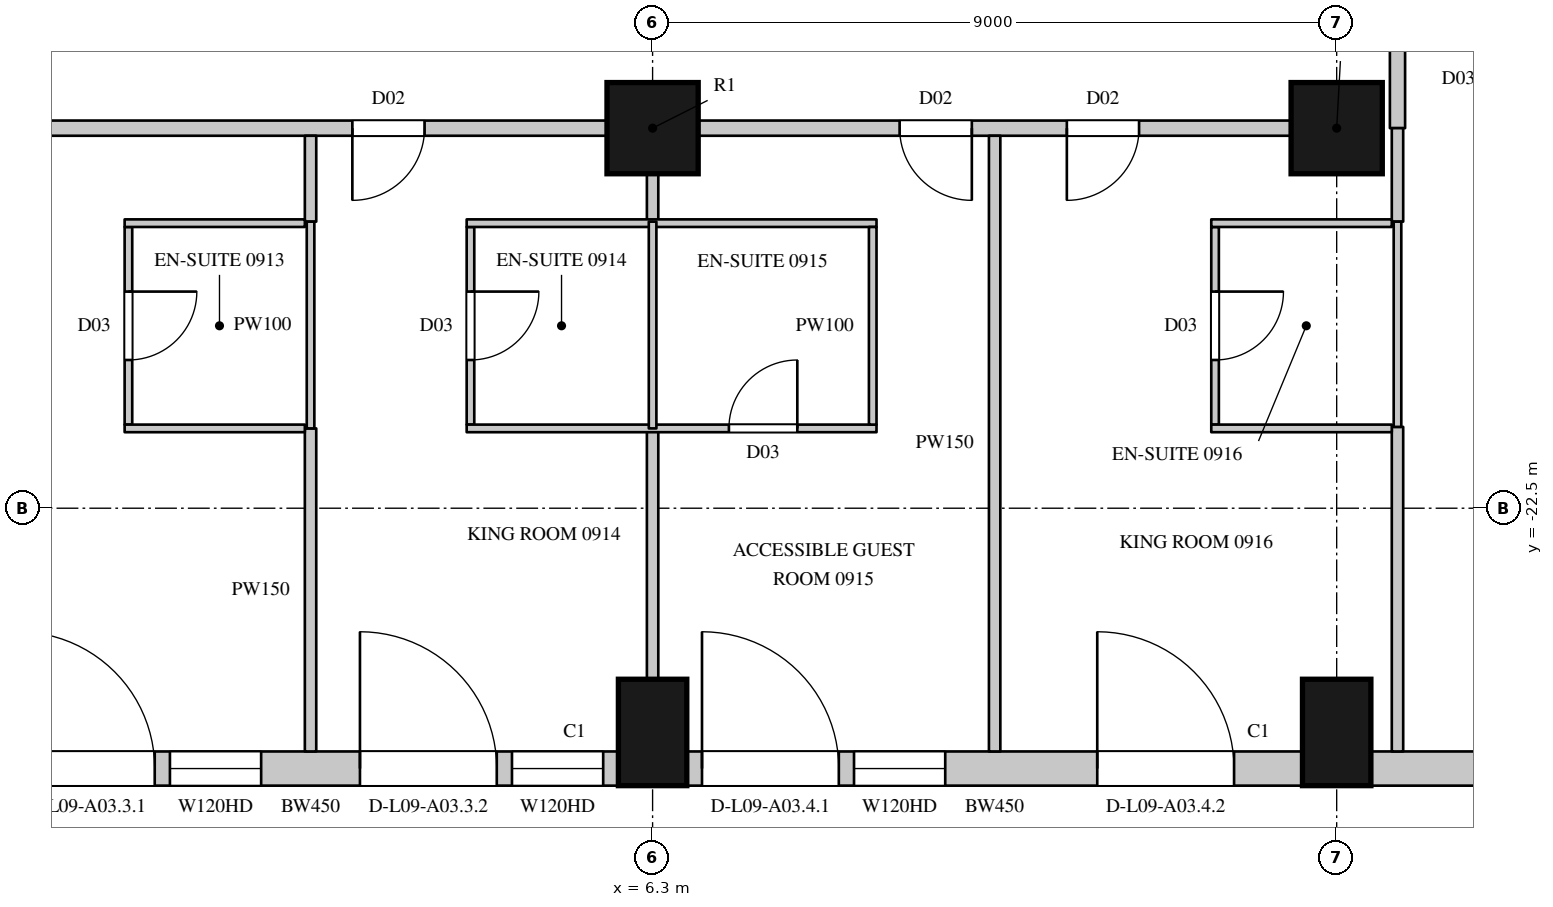
"""IFC4 building model, lengths in metres.
Left out: names, types, materials, properties, quantities, classifications, styles, units other than length and angle.
Written with IfcOpenShell. Run it as: python <this file> out.ifc"""

import sys

from ifc_helpers import new_model, si_unit, direction, frame, frame_2d, origin, origin_2d, place, context, subcontext, project, spatial, rectangle, circle, extrude, element, fill, save


model = new_model("IFC4")
c1 = context("Model", 3, precision=1e-05, world=origin(), true_north=direction((0.0, 1.0)))
c2 = subcontext(c1, "Body", "Model", "MODEL_VIEW")
j1 = project(units=[si_unit("LENGTHUNIT", "METRE"), si_unit("PLANEANGLEUNIT", "RADIAN")], contexts=[c1])
p1 = place(None, origin())
s1 = spatial("IfcSite", under=j1, at=p1, CompositionType="ELEMENT")
p2 = place(p1, origin())
s2 = spatial("IfcBuilding", under=s1, at=p2, CompositionType="ELEMENT")
p3 = place(p2, frame((0.0, 0.0, 62.7)))
s3 = spatial("IfcBuildingStorey", under=s2, at=p3, CompositionType="ELEMENT", Elevation=62.7)
for number, where, z_axis, x_axis in (
    (1, (6.3, -25.45, 0.0), (0.0, 0.0, 1.0), (1.0, 0.0, 0.0)),
    (2, (15.3, -25.45, 0.0), (0.0, 0.0, 1.0), (1.0, 0.0, 0.0)),
):
    element("IfcColumn", number, at=place(p3, frame(where, z_axis=z_axis, x_axis=x_axis)), inside=s3, PredefinedType="COLUMN", context=c2, shape_type="SweptSolid", body=[
        extrude(rectangle(XDim=0.9, YDim=1.4, at=origin_2d()), origin(), (0.0, 0.0, 1.0), 3.6),
    ])
for number, where, z_axis, x_axis in (
    (3, (6.3, -17.5, 0.0), (0.0, 0.0, 1.0), (1.0, 0.0, 0.0)),
    (4, (15.3, -17.5, 0.0), (0.0, 0.0, 1.0), (1.0, 0.0, 0.0)),
):
    element("IfcColumn", number, at=place(p3, frame(where, z_axis=z_axis, x_axis=x_axis)), inside=s3, PredefinedType="COLUMN", context=c2, shape_type="SweptSolid", body=[
        extrude(circle(Radius=0.6, at=origin_2d()), origin(), (0.0, 0.0, 1.0), 3.6),
    ])
p4 = place(p3, frame((-2.25, -25.925, 0.0), z_axis=(0.0, 0.0, 1.0), x_axis=(1.0, 0.0, 0.0)))
e5 = element("IfcWall", 5, at=p4, inside=s3, PredefinedType="SOLIDWALL", context=c2, shape_type="SweptSolid", body=[
    extrude(rectangle(XDim=8.1, YDim=0.45, at=frame_2d((4.05, 0.0))), origin(), (0.0, 0.0, 1.0), 3.3),
])
p5 = place(p4, frame((0.2, 0.0, 0.0)))
e6 = element("IfcOpeningElement", 6, at=p5, cuts=e5, PredefinedType="OPENING", context=c2, shape_type="SweptSolid", body=[
    extrude(rectangle(XDim=1.8, YDim=2.4, at=frame_2d((0.9, 1.2))), frame((0.0, 0.235, 0.0), z_axis=(0.0, -1.0, 0.0), x_axis=(1.0, 0.0, 0.0)), (0.0, 0.0, 1.0), 0.47),
])
p6 = place(p4, frame((2.2, 0.0, 1.05)))
e7 = element("IfcOpeningElement", 7, at=p6, cuts=e5, PredefinedType="OPENING", context=c2, shape_type="SweptSolid", body=[
    extrude(rectangle(XDim=1.2, YDim=2.0, at=frame_2d((0.6, 1.0))), frame((0.0, 0.235, 0.0), z_axis=(0.0, -1.0, 0.0), x_axis=(1.0, 0.0, 0.0)), (0.0, 0.0, 1.0), 0.47),
])
p7 = place(p4, frame((4.7, 0.0, 0.0)))
e8 = element("IfcOpeningElement", 8, at=p7, cuts=e5, PredefinedType="OPENING", context=c2, shape_type="SweptSolid", body=[
    extrude(rectangle(XDim=1.8, YDim=2.4, at=frame_2d((0.9, 1.2))), frame((0.0, 0.235, 0.0), z_axis=(0.0, -1.0, 0.0), x_axis=(1.0, 0.0, 0.0)), (0.0, 0.0, 1.0), 0.47),
])
p8 = place(p4, frame((6.7, 0.0, 1.05)))
e9 = element("IfcOpeningElement", 9, at=p8, cuts=e5, PredefinedType="OPENING", context=c2, shape_type="SweptSolid", body=[
    extrude(rectangle(XDim=1.2, YDim=2.0, at=frame_2d((0.6, 1.0))), frame((0.0, 0.235, 0.0), z_axis=(0.0, -1.0, 0.0), x_axis=(1.0, 0.0, 0.0)), (0.0, 0.0, 1.0), 0.47),
])
p9 = place(p3, frame((6.75, -25.925, 0.0), z_axis=(0.0, 0.0, 1.0), x_axis=(1.0, 0.0, 0.0)))
e10 = element("IfcWall", 10, at=p9, inside=s3, PredefinedType="SOLIDWALL", context=c2, shape_type="SweptSolid", body=[
    extrude(rectangle(XDim=8.1, YDim=0.45, at=frame_2d((4.05, 0.0))), origin(), (0.0, 0.0, 1.0), 3.3),
])
p10 = place(p9, frame((0.2, 0.0, 0.0)))
e11 = element("IfcOpeningElement", 11, at=p10, cuts=e10, PredefinedType="OPENING", context=c2, shape_type="SweptSolid", body=[
    extrude(rectangle(XDim=1.8, YDim=2.4, at=frame_2d((0.9, 1.2))), frame((0.0, 0.235, 0.0), z_axis=(0.0, -1.0, 0.0), x_axis=(1.0, 0.0, 0.0)), (0.0, 0.0, 1.0), 0.47),
])
p11 = place(p9, frame((2.2, 0.0, 1.05)))
e12 = element("IfcOpeningElement", 12, at=p11, cuts=e10, PredefinedType="OPENING", context=c2, shape_type="SweptSolid", body=[
    extrude(rectangle(XDim=1.2, YDim=2.0, at=frame_2d((0.6, 1.0))), frame((0.0, 0.235, 0.0), z_axis=(0.0, -1.0, 0.0), x_axis=(1.0, 0.0, 0.0)), (0.0, 0.0, 1.0), 0.47),
])
p12 = place(p9, frame((5.4, 0.0, 0.0)))
e13 = element("IfcOpeningElement", 13, at=p12, cuts=e10, PredefinedType="OPENING", context=c2, shape_type="SweptSolid", body=[
    extrude(rectangle(XDim=1.8, YDim=2.4, at=frame_2d((0.9, 1.2))), frame((0.0, 0.235, 0.0), z_axis=(0.0, -1.0, 0.0), x_axis=(1.0, 0.0, 0.0)), (0.0, 0.0, 1.0), 0.47),
])
p13 = place(p3, frame((15.75, -25.925, 0.0), z_axis=(0.0, 0.0, 1.0), x_axis=(1.0, 0.0, 0.0)))
e14 = element("IfcWall", 14, at=p13, inside=s3, PredefinedType="SOLIDWALL", context=c2, shape_type="SweptSolid", body=[
    extrude(rectangle(XDim=2.914, YDim=0.45, at=frame_2d((1.457, 0.0))), origin(), (0.0, 0.0, 1.0), 3.3),
])
p14 = place(p3, frame((-2.1, -17.5, 0.0), z_axis=(0.0, 0.0, 1.0), x_axis=(1.0, 0.0, 0.0)))
e15 = element("IfcWall", 15, at=p14, inside=s3, PredefinedType="PARTITIONING", context=c2, shape_type="SweptSolid", body=[
    extrude(rectangle(XDim=7.8, YDim=0.2, at=frame_2d((3.9, 0.0))), origin(), (0.0, 0.0, 1.0), 2.75),
])
p15 = place(p14, frame((4.45, 0.0, 0.0)))
e16 = element("IfcOpeningElement", 16, at=p15, cuts=e15, PredefinedType="OPENING", context=c2, shape_type="SweptSolid", body=[
    extrude(rectangle(XDim=0.95, YDim=2.2, at=frame_2d((0.475, 1.1))), frame((0.0, 0.11, 0.0), z_axis=(0.0, -1.0, 0.0), x_axis=(1.0, 0.0, 0.0)), (0.0, 0.0, 1.0), 0.22),
])
p16 = place(p3, frame((6.9, -17.5, 0.0), z_axis=(0.0, 0.0, 1.0), x_axis=(1.0, 0.0, 0.0)))
e17 = element("IfcWall", 17, at=p16, inside=s3, PredefinedType="PARTITIONING", context=c2, shape_type="SweptSolid", body=[
    extrude(rectangle(XDim=7.8, YDim=0.2, at=frame_2d((3.9, 0.0))), origin(), (0.0, 0.0, 1.0), 2.75),
])
p17 = place(p16, frame((2.65, 0.0, 0.0)))
e18 = element("IfcOpeningElement", 18, at=p17, cuts=e17, PredefinedType="OPENING", context=c2, shape_type="SweptSolid", body=[
    extrude(rectangle(XDim=0.95, YDim=2.2, at=frame_2d((0.475, 1.1))), frame((0.0, 0.11, 0.0), z_axis=(0.0, -1.0, 0.0), x_axis=(1.0, 0.0, 0.0)), (0.0, 0.0, 1.0), 0.22),
])
p18 = place(p16, frame((4.85, 0.0, 0.0)))
e19 = element("IfcOpeningElement", 19, at=p18, cuts=e17, PredefinedType="OPENING", context=c2, shape_type="SweptSolid", body=[
    extrude(rectangle(XDim=0.95, YDim=2.2, at=frame_2d((0.475, 1.1))), frame((0.0, 0.11, 0.0), z_axis=(0.0, -1.0, 0.0), x_axis=(1.0, 0.0, 0.0)), (0.0, 0.0, 1.0), 0.22),
])
p19 = place(p3, frame((16.1, -17.5, 0.0), z_axis=(0.0, 0.0, 1.0), x_axis=(0.0, 1.0, 0.0)))
e20 = element("IfcWall", 20, at=p19, inside=s3, PredefinedType="PARTITIONING", context=c2, shape_type="SweptSolid", body=[
    extrude(rectangle(XDim=12.75, YDim=0.2, at=frame_2d((6.375, 0.0))), origin(), (0.0, 0.0, 1.0), 3.3),
])
p20 = place(p19, frame((2.75, 0.0, 0.0)))
e21 = element("IfcOpeningElement", 21, at=p20, cuts=e20, PredefinedType="OPENING", context=c2, shape_type="SweptSolid", body=[
    extrude(rectangle(XDim=0.95, YDim=2.2, at=frame_2d((0.475, 1.1))), frame((0.0, 0.11, 0.0), z_axis=(0.0, -1.0, 0.0), x_axis=(1.0, 0.0, 0.0)), (0.0, 0.0, 1.0), 0.22),
])
p21 = place(p19, frame((6.95, 0.0, 0.0)))
e22 = element("IfcOpeningElement", 22, at=p21, cuts=e20, PredefinedType="OPENING", context=c2, shape_type="SweptSolid", body=[
    extrude(rectangle(XDim=0.95, YDim=2.2, at=frame_2d((0.475, 1.1))), frame((0.0, 0.11, 0.0), z_axis=(0.0, -1.0, 0.0), x_axis=(1.0, 0.0, 0.0)), (0.0, 0.0, 1.0), 0.22),
])
p22 = place(p19, frame((11.4, 0.0, 0.0)))
e23 = element("IfcOpeningElement", 23, at=p22, cuts=e20, PredefinedType="OPENING", context=c2, shape_type="SweptSolid", body=[
    extrude(rectangle(XDim=0.95, YDim=2.2, at=frame_2d((0.475, 1.1))), frame((0.0, 0.11, 0.0), z_axis=(0.0, -1.0, 0.0), x_axis=(1.0, 0.0, 0.0)), (0.0, 0.0, 1.0), 0.22),
])
p23 = place(p3, frame((1.8, -25.7, 0.0), z_axis=(0.0, 0.0, 1.0), x_axis=(0.0, 1.0, 0.0)))
e24 = element("IfcWall", 24, at=p23, inside=s3, PredefinedType="PARTITIONING", context=c2, shape_type="SweptSolid", body=[
    extrude(rectangle(XDim=4.25, YDim=0.15, at=frame_2d((2.125, 0.0))), origin(), (0.0, 0.0, 1.0), 2.65),
])
p24 = place(p3, frame((1.8, -18.73, 0.0), z_axis=(0.0, 0.0, 1.0), x_axis=(0.0, 1.0, 0.0)))
e25 = element("IfcWall", 25, at=p24, inside=s3, PredefinedType="PARTITIONING", context=c2, shape_type="SweptSolid", body=[
    extrude(rectangle(XDim=1.13, YDim=0.15, at=frame_2d((0.565, 0.0))), origin(), (0.0, 0.0, 1.0), 2.65),
])
p25 = place(p3, frame((6.3, -24.75, 0.0), z_axis=(0.0, 0.0, 1.0), x_axis=(0.0, 1.0, 0.0)))
e26 = element("IfcWall", 26, at=p25, inside=s3, PredefinedType="PARTITIONING", context=c2, shape_type="SweptSolid", body=[
    extrude(rectangle(XDim=3.3, YDim=0.15, at=frame_2d((1.65, 0.0))), origin(), (0.0, 0.0, 1.0), 2.75),
])
p26 = place(p3, frame((6.3, -18.73, 0.0), z_axis=(0.0, 0.0, 1.0), x_axis=(0.0, 1.0, 0.0)))
e27 = element("IfcWall", 27, at=p26, inside=s3, PredefinedType="PARTITIONING", context=c2, shape_type="SweptSolid", body=[
    extrude(rectangle(XDim=0.63, YDim=0.15, at=frame_2d((0.315, 0.0))), origin(), (0.0, 0.0, 1.0), 2.75),
])
p27 = place(p3, frame((10.8, -25.7, 0.0), z_axis=(0.0, 0.0, 1.0), x_axis=(0.0, 1.0, 0.0)))
e28 = element("IfcWall", 28, at=p27, inside=s3, PredefinedType="PARTITIONING", context=c2, shape_type="SweptSolid", body=[
    extrude(rectangle(XDim=8.1, YDim=0.15, at=frame_2d((4.05, 0.0))), origin(), (0.0, 0.0, 1.0), 2.65),
])
p28 = place(p3, frame((16.1, -25.7, 0.0), z_axis=(0.0, 0.0, 1.0), x_axis=(0.0, 1.0, 0.0)))
e29 = element("IfcWall", 29, at=p28, inside=s3, PredefinedType="PARTITIONING", context=c2, shape_type="SweptSolid", body=[
    extrude(rectangle(XDim=4.27, YDim=0.15, at=frame_2d((2.135, 0.0))), origin(), (0.0, 0.0, 1.0), 3.3),
])
p29 = place(p3, frame((16.1, -18.73, 0.0), z_axis=(0.0, 0.0, 1.0), x_axis=(0.0, 1.0, 0.0)))
e30 = element("IfcWall", 30, at=p29, inside=s3, PredefinedType="PARTITIONING", context=c2, shape_type="SweptSolid", body=[
    extrude(rectangle(XDim=1.23, YDim=0.15, at=frame_2d((0.615, 0.0))), origin(), (0.0, 0.0, 1.0), 3.3),
])
p30 = place(p3, frame((-0.596, -21.4, 0.0), z_axis=(0.0, 0.0, 1.0), x_axis=(0.0, 1.0, 0.0)))
e31 = element("IfcWall", 31, at=p30, inside=s3, PredefinedType="PARTITIONING", context=c2, shape_type="SweptSolid", body=[
    extrude(rectangle(XDim=2.6, YDim=0.1, at=frame_2d((1.3, 0.0))), origin(), (0.0, 0.0, 1.0), 3.3),
])
p31 = place(p30, frame((0.85, 0.0, 0.0)))
e32 = element("IfcOpeningElement", 32, at=p31, cuts=e31, PredefinedType="OPENING", context=c2, shape_type="SweptSolid", body=[
    extrude(rectangle(XDim=0.9, YDim=2.2, at=frame_2d((0.45, 1.1))), frame((0.0, 0.06, 0.0), z_axis=(0.0, -1.0, 0.0), x_axis=(1.0, 0.0, 0.0)), (0.0, 0.0, 1.0), 0.12),
])
for number, where, z_axis, x_axis in (
    (33, (-0.646, -21.45, 0.0), (0.0, 0.0, 1.0), (1.0, 0.0, 0.0)),
    (34, (-0.646, -18.75, 0.0), (0.0, 0.0, 1.0), (1.0, 0.0, 0.0)),
):
    element("IfcWall", number, at=place(p3, frame(where, z_axis=z_axis, x_axis=x_axis)), inside=s3, PredefinedType="PARTITIONING", context=c2, shape_type="SweptSolid", body=[
        extrude(rectangle(XDim=2.371, YDim=0.1, at=frame_2d((1.186, 0.0))), origin(), (0.0, 0.0, 1.0), 3.3),
    ])
p32 = place(p3, frame((1.8, -21.45, 0.0), z_axis=(0.0, 0.0, 1.0), x_axis=(0.0, 1.0, 0.0)))
e35 = element("IfcWall", 35, at=p32, inside=s3, PredefinedType="PARTITIONING", context=c2, shape_type="SweptSolid", body=[
    extrude(rectangle(XDim=2.72, YDim=0.1, at=frame_2d((1.36, 0.0))), origin(), (0.0, 0.0, 1.0), 2.65),
])
p33 = place(p3, frame((3.904, -21.4, 0.0), z_axis=(0.0, 0.0, 1.0), x_axis=(0.0, 1.0, 0.0)))
e36 = element("IfcWall", 36, at=p33, inside=s3, PredefinedType="PARTITIONING", context=c2, shape_type="SweptSolid", body=[
    extrude(rectangle(XDim=2.6, YDim=0.1, at=frame_2d((1.3, 0.0))), origin(), (0.0, 0.0, 1.0), 3.3),
])
p34 = place(p33, frame((0.85, 0.0, 0.0)))
e37 = element("IfcOpeningElement", 37, at=p34, cuts=e36, PredefinedType="OPENING", context=c2, shape_type="SweptSolid", body=[
    extrude(rectangle(XDim=0.9, YDim=2.2, at=frame_2d((0.45, 1.1))), frame((0.0, 0.06, 0.0), z_axis=(0.0, -1.0, 0.0), x_axis=(1.0, 0.0, 0.0)), (0.0, 0.0, 1.0), 0.12),
])
p35 = place(p3, frame((3.854, -21.45, 0.0), z_axis=(0.0, 0.0, 1.0), x_axis=(1.0, 0.0, 0.0)))
e38 = element("IfcWall", 38, at=p35, inside=s3, PredefinedType="PARTITIONING", context=c2, shape_type="SweptSolid", body=[
    extrude(rectangle(XDim=5.392, YDim=0.1, at=frame_2d((2.696, 0.0))), origin(), (0.0, 0.0, 1.0), 3.3),
])
p36 = place(p35, frame((3.45, 0.0, 0.0)))
e39 = element("IfcOpeningElement", 39, at=p36, cuts=e38, PredefinedType="OPENING", context=c2, shape_type="SweptSolid", body=[
    extrude(rectangle(XDim=0.9, YDim=2.2, at=frame_2d((0.45, 1.1))), frame((0.0, 0.06, 0.0), z_axis=(0.0, -1.0, 0.0), x_axis=(1.0, 0.0, 0.0)), (0.0, 0.0, 1.0), 0.12),
])
p37 = place(p3, frame((3.854, -18.75, 0.0), z_axis=(0.0, 0.0, 1.0), x_axis=(1.0, 0.0, 0.0)))
e40 = element("IfcWall", 40, at=p37, inside=s3, PredefinedType="PARTITIONING", context=c2, shape_type="SweptSolid", body=[
    extrude(rectangle(XDim=5.392, YDim=0.1, at=frame_2d((2.696, 0.0))), origin(), (0.0, 0.0, 1.0), 3.3),
])
p38 = place(p3, frame((6.3, -21.45, 0.0), z_axis=(0.0, 0.0, 1.0), x_axis=(0.0, 1.0, 0.0)))
e41 = element("IfcWall", 41, at=p38, inside=s3, PredefinedType="PARTITIONING", context=c2, shape_type="SweptSolid", body=[
    extrude(rectangle(XDim=2.72, YDim=0.1, at=frame_2d((1.36, 0.0))), origin(), (0.0, 0.0, 1.0), 2.75),
])
p39 = place(p3, frame((9.196, -21.4, 0.0), z_axis=(0.0, 0.0, 1.0), x_axis=(0.0, 1.0, 0.0)))
e42 = element("IfcWall", 42, at=p39, inside=s3, PredefinedType="PARTITIONING", context=c2, shape_type="SweptSolid", body=[
    extrude(rectangle(XDim=2.6, YDim=0.1, at=frame_2d((1.3, 0.0))), origin(), (0.0, 0.0, 1.0), 3.3),
])
p40 = place(p3, frame((13.7, -21.4, 0.0), z_axis=(0.0, 0.0, 1.0), x_axis=(0.0, 1.0, 0.0)))
e43 = element("IfcWall", 43, at=p40, inside=s3, PredefinedType="PARTITIONING", context=c2, shape_type="SweptSolid", body=[
    extrude(rectangle(XDim=2.6, YDim=0.1, at=frame_2d((1.3, 0.0))), origin(), (0.0, 0.0, 1.0), 3.3),
])
p41 = place(p40, frame((0.85, 0.0, 0.0)))
e44 = element("IfcOpeningElement", 44, at=p41, cuts=e43, PredefinedType="OPENING", context=c2, shape_type="SweptSolid", body=[
    extrude(rectangle(XDim=0.9, YDim=2.2, at=frame_2d((0.45, 1.1))), frame((0.0, 0.06, 0.0), z_axis=(0.0, -1.0, 0.0), x_axis=(1.0, 0.0, 0.0)), (0.0, 0.0, 1.0), 0.12),
])
for number, where, z_axis, x_axis in (
    (45, (13.65, -21.45, 0.0), (0.0, 0.0, 1.0), (1.0, 0.0, 0.0)),
    (46, (13.65, -18.75, 0.0), (0.0, 0.0, 1.0), (1.0, 0.0, 0.0)),
):
    element("IfcWall", number, at=place(p3, frame(where, z_axis=z_axis, x_axis=x_axis)), inside=s3, PredefinedType="PARTITIONING", context=c2, shape_type="SweptSolid", body=[
        extrude(rectangle(XDim=2.375, YDim=0.1, at=frame_2d((1.188, 0.0))), origin(), (0.0, 0.0, 1.0), 3.3),
    ])
p42 = place(p3, frame((16.1, -21.43, 0.0), z_axis=(0.0, 0.0, 1.0), x_axis=(0.0, 1.0, 0.0)))
e47 = element("IfcWall", 47, at=p42, inside=s3, PredefinedType="PARTITIONING", context=c2, shape_type="SweptSolid", body=[
    extrude(rectangle(XDim=2.7, YDim=0.1, at=frame_2d((1.35, 0.0))), origin(), (0.0, 0.0, 1.0), 3.3),
])
p43 = place(p5, origin())
e48 = element("IfcDoor", 48, at=p43, inside=s3, OperationType="SLIDING_TO_LEFT", PredefinedType="DOOR", context=c2, shape_type="SweptSolid", body=[
    extrude(rectangle(XDim=1.8, YDim=2.4, at=frame_2d((0.9, 1.2))), frame((0.0, 0.13, 0.0), z_axis=(0.0, -1.0, 0.0), x_axis=(1.0, 0.0, 0.0)), (0.0, 0.0, 1.0), 0.05),
])
fill(e6, e48)
p44 = place(p6, origin())
e49 = element("IfcWindow", 49, at=p44, inside=s3, PartitioningType="SINGLE_PANEL", PredefinedType="WINDOW", context=c2, shape_type="SweptSolid", body=[
    extrude(rectangle(XDim=1.2, YDim=2.0, at=frame_2d((0.6, 1.0))), frame((0.0, 0.135, 0.0), z_axis=(0.0, -1.0, 0.0), x_axis=(1.0, 0.0, 0.0)), (0.0, 0.0, 1.0), 0.06),
])
fill(e7, e49)
p45 = place(p7, origin())
e50 = element("IfcDoor", 50, at=p45, inside=s3, OperationType="SLIDING_TO_LEFT", PredefinedType="DOOR", context=c2, shape_type="SweptSolid", body=[
    extrude(rectangle(XDim=1.8, YDim=2.4, at=frame_2d((0.9, 1.2))), frame((0.0, 0.13, 0.0), z_axis=(0.0, -1.0, 0.0), x_axis=(1.0, 0.0, 0.0)), (0.0, 0.0, 1.0), 0.05),
])
fill(e8, e50)
p46 = place(p8, origin())
e51 = element("IfcWindow", 51, at=p46, inside=s3, PartitioningType="SINGLE_PANEL", PredefinedType="WINDOW", context=c2, shape_type="SweptSolid", body=[
    extrude(rectangle(XDim=1.2, YDim=2.0, at=frame_2d((0.6, 1.0))), frame((0.0, 0.135, 0.0), z_axis=(0.0, -1.0, 0.0), x_axis=(1.0, 0.0, 0.0)), (0.0, 0.0, 1.0), 0.06),
])
fill(e9, e51)
p47 = place(p10, origin())
e52 = element("IfcDoor", 52, at=p47, inside=s3, OperationType="SLIDING_TO_LEFT", PredefinedType="DOOR", context=c2, shape_type="SweptSolid", body=[
    extrude(rectangle(XDim=1.8, YDim=2.4, at=frame_2d((0.9, 1.2))), frame((0.0, 0.13, 0.0), z_axis=(0.0, -1.0, 0.0), x_axis=(1.0, 0.0, 0.0)), (0.0, 0.0, 1.0), 0.05),
])
fill(e11, e52)
p48 = place(p11, origin())
e53 = element("IfcWindow", 53, at=p48, inside=s3, PartitioningType="SINGLE_PANEL", PredefinedType="WINDOW", context=c2, shape_type="SweptSolid", body=[
    extrude(rectangle(XDim=1.2, YDim=2.0, at=frame_2d((0.6, 1.0))), frame((0.0, 0.135, 0.0), z_axis=(0.0, -1.0, 0.0), x_axis=(1.0, 0.0, 0.0)), (0.0, 0.0, 1.0), 0.06),
])
fill(e12, e53)
p49 = place(p12, origin())
e54 = element("IfcDoor", 54, at=p49, inside=s3, OperationType="SLIDING_TO_LEFT", PredefinedType="DOOR", context=c2, shape_type="SweptSolid", body=[
    extrude(rectangle(XDim=1.8, YDim=2.4, at=frame_2d((0.9, 1.2))), frame((0.0, 0.13, 0.0), z_axis=(0.0, -1.0, 0.0), x_axis=(1.0, 0.0, 0.0)), (0.0, 0.0, 1.0), 0.05),
])
fill(e13, e54)
p50 = place(p31, origin())
e55 = element("IfcDoor", 55, at=p50, inside=s3, OperationType="SINGLE_SWING_LEFT", PredefinedType="DOOR", context=c2, shape_type="SweptSolid", body=[
    extrude(rectangle(XDim=0.9, YDim=2.2, at=frame_2d((0.45, 1.1))), frame((0.0, 0.025, 0.0), z_axis=(0.0, -1.0, 0.0), x_axis=(1.0, 0.0, 0.0)), (0.0, 0.0, 1.0), 0.05),
])
fill(e32, e55)
p51 = place(p15, origin())
e56 = element("IfcDoor", 56, at=p51, inside=s3, OperationType="SINGLE_SWING_RIGHT", PredefinedType="DOOR", context=c2, shape_type="SweptSolid", body=[
    extrude(rectangle(XDim=0.95, YDim=2.2, at=frame_2d((0.475, 1.1))), frame((0.0, 0.025, 0.0), z_axis=(0.0, -1.0, 0.0), x_axis=(1.0, 0.0, 0.0)), (0.0, 0.0, 1.0), 0.05),
])
fill(e16, e56)
p52 = place(p34, origin())
e57 = element("IfcDoor", 57, at=p52, inside=s3, OperationType="SINGLE_SWING_LEFT", PredefinedType="DOOR", context=c2, shape_type="SweptSolid", body=[
    extrude(rectangle(XDim=0.9, YDim=2.2, at=frame_2d((0.45, 1.1))), frame((0.0, 0.025, 0.0), z_axis=(0.0, -1.0, 0.0), x_axis=(1.0, 0.0, 0.0)), (0.0, 0.0, 1.0), 0.05),
])
fill(e37, e57)
p53 = place(p17, origin())
e58 = element("IfcDoor", 58, at=p53, inside=s3, OperationType="SINGLE_SWING_LEFT", PredefinedType="DOOR", context=c2, shape_type="SweptSolid", body=[
    extrude(rectangle(XDim=0.95, YDim=2.2, at=frame_2d((0.475, 1.1))), frame((0.0, 0.025, 0.0), z_axis=(0.0, -1.0, 0.0), x_axis=(1.0, 0.0, 0.0)), (0.0, 0.0, 1.0), 0.05),
])
fill(e18, e58)
p54 = place(p36, origin())
e59 = element("IfcDoor", 59, at=p54, inside=s3, OperationType="SINGLE_SWING_RIGHT", PredefinedType="DOOR", context=c2, shape_type="SweptSolid", body=[
    extrude(rectangle(XDim=0.9, YDim=2.2, at=frame_2d((0.45, 1.1))), frame((0.0, 0.025, 0.0), z_axis=(0.0, -1.0, 0.0), x_axis=(1.0, 0.0, 0.0)), (0.0, 0.0, 1.0), 0.05),
])
fill(e39, e59)
p55 = place(p18, origin())
e60 = element("IfcDoor", 60, at=p55, inside=s3, OperationType="SINGLE_SWING_RIGHT", PredefinedType="DOOR", context=c2, shape_type="SweptSolid", body=[
    extrude(rectangle(XDim=0.95, YDim=2.2, at=frame_2d((0.475, 1.1))), frame((0.0, 0.025, 0.0), z_axis=(0.0, -1.0, 0.0), x_axis=(1.0, 0.0, 0.0)), (0.0, 0.0, 1.0), 0.05),
])
fill(e19, e60)
p56 = place(p41, origin())
e61 = element("IfcDoor", 61, at=p56, inside=s3, OperationType="SINGLE_SWING_LEFT", PredefinedType="DOOR", context=c2, shape_type="SweptSolid", body=[
    extrude(rectangle(XDim=0.9, YDim=2.2, at=frame_2d((0.45, 1.1))), frame((0.0, 0.025, 0.0), z_axis=(0.0, -1.0, 0.0), x_axis=(1.0, 0.0, 0.0)), (0.0, 0.0, 1.0), 0.05),
])
fill(e44, e61)
save(model, sys.argv[1])
